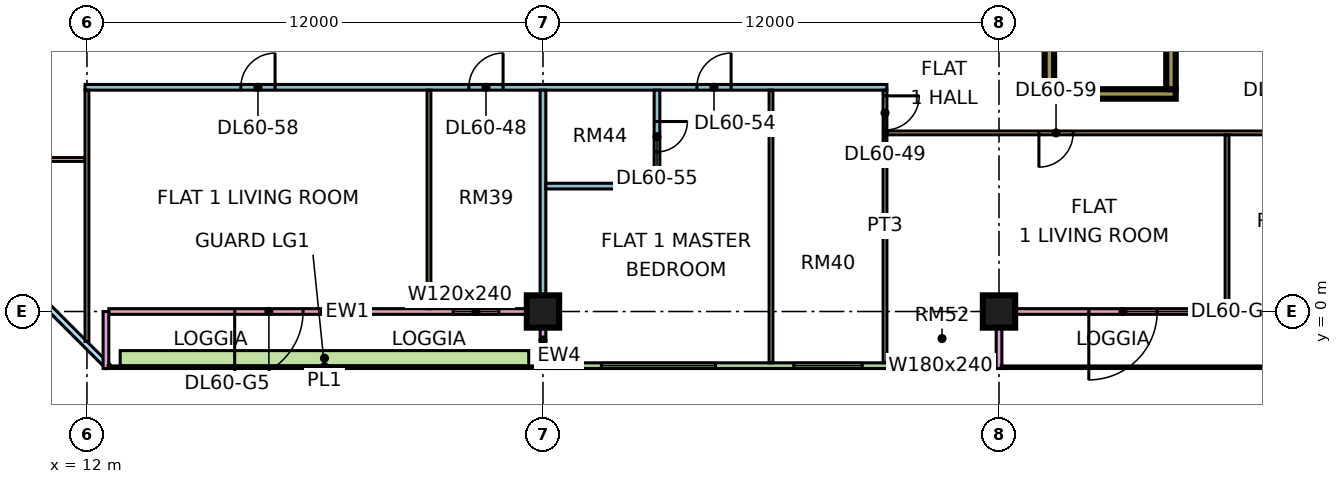
"""IFC4 building model, lengths in metres.
Left out: names, types, materials, properties, quantities, classifications, styles, units other than length and angle.
Written with IfcOpenShell. Run it as: python <this file> out.ifc"""

import sys

from ifc_helpers import new_model, si_unit, direction, frame, frame_2d, origin, origin_2d, place, context, subcontext, project, spatial, rectangle, extrude, element, fill, save


model = new_model("IFC4")
c1 = context("Model", 3, precision=1e-05, world=origin(), true_north=direction((0.0, 1.0)))
c2 = subcontext(c1, "Body", "Model", "MODEL_VIEW")
j1 = project(units=[si_unit("LENGTHUNIT", "METRE"), si_unit("PLANEANGLEUNIT", "RADIAN")], contexts=[c1])
p1 = place(None, origin())
s1 = spatial("IfcSite", under=j1, at=p1, CompositionType="ELEMENT")
p2 = place(p1, origin())
s2 = spatial("IfcBuilding", under=s1, at=p2, CompositionType="ELEMENT")
p3 = place(p2, frame((0.0, 0.0, 252.9)))
s3 = spatial("IfcBuildingStorey", under=s2, at=p3, CompositionType="ELEMENT", Elevation=252.9)
for number, where, z_axis, x_axis in (
    (1, (24.0, 0.0, 0.0), (0.0, 0.0, 1.0), (1.0, 0.0, 0.0)),
    (2, (36.0, 0.0, 0.0), (0.0, 0.0, 1.0), (1.0, 0.0, 0.0)),
):
    element("IfcColumn", number, at=place(p3, frame(where, z_axis=z_axis, x_axis=x_axis)), inside=s3, PredefinedType="COLUMN", context=c2, shape_type="SweptSolid", body=[
        extrude(rectangle(XDim=0.85, YDim=0.85, at=origin_2d()), origin(), (0.0, 0.0, 1.0), 3.75),
    ])
p4 = place(p3, frame((37.2, 5.725, 0.0), z_axis=(0.0, 0.0, 1.0), x_axis=(1.0, 0.0, 0.0)))
e3 = element("IfcWall", 3, at=p4, inside=s3, PredefinedType="SHEAR", context=c2, shape_type="SweptSolid", body=[
    extrude(rectangle(XDim=3.45, YDim=0.25, at=frame_2d((1.725, 0.0))), origin(), (0.0, 0.0, 1.0), 3.75),
])
for number, where, z_axis, x_axis in (
    (4, (37.325, 5.85, 0.0), (0.0, 0.0, 1.0), (0.0, 1.0, 0.0)),
    (5, (40.525, 5.85, 0.0), (0.0, 0.0, 1.0), (0.0, 1.0, 0.0)),
):
    element("IfcWall", number, at=place(p3, frame(where, z_axis=z_axis, x_axis=x_axis)), inside=s3, PredefinedType="SHEAR", context=c2, shape_type="SweptSolid", body=[
        extrude(rectangle(XDim=6.5, YDim=0.25, at=frame_2d((3.25, 0.0))), origin(), (0.0, 0.0, 1.0), 3.75),
    ])
p5 = place(p3, frame((-1.447, 12.553, 0.0), z_axis=(0.0, 0.0, 1.0), x_axis=(0.707106781187, -0.707106781187, 0.0)))
e6 = element("IfcWall", 6, at=p5, inside=s3, PredefinedType="SOLIDWALL", context=c2, shape_type="SweptSolid", body=[
    extrude(rectangle(XDim=19.799, YDim=0.15, at=frame_2d((9.899, 0.0))), origin(), (0.0, 0.0, 1.0), 3.3),
])
p6 = place(p5, frame((2.212, 0.0, 0.45)))
e7 = element("IfcOpeningElement", 7, at=p6, cuts=e6, PredefinedType="OPENING", context=c2, shape_type="SweptSolid", body=[
    extrude(rectangle(XDim=3.0, YDim=2.4, at=frame_2d((1.5, 1.2))), frame((0.0, 0.085, 0.0), z_axis=(0.0, -1.0, 0.0), x_axis=(1.0, 0.0, 0.0)), (0.0, 0.0, 1.0), 0.17),
])
p7 = place(p5, frame((10.216, 0.0, 0.45)))
e8 = element("IfcOpeningElement", 8, at=p7, cuts=e6, PredefinedType="OPENING", context=c2, shape_type="SweptSolid", body=[
    extrude(rectangle(XDim=3.0, YDim=2.4, at=frame_2d((1.5, 1.2))), frame((0.0, 0.085, 0.0), z_axis=(0.0, -1.0, 0.0), x_axis=(1.0, 0.0, 0.0)), (0.0, 0.0, 1.0), 0.17),
])
p8 = place(p3, frame((12.575, 0.0, 0.0), z_axis=(0.0, 0.0, 1.0), x_axis=(1.0, 0.0, 0.0)))
e9 = element("IfcWall", 9, at=p8, inside=s3, PredefinedType="SOLIDWALL", context=c2, shape_type="SweptSolid", body=[
    extrude(rectangle(XDim=11.35, YDim=0.15, at=frame_2d((5.675, 0.0))), origin(), (0.0, 0.0, 1.0), 3.3),
])
p9 = place(p8, frame((3.312, 0.0, 0.0)))
e10 = element("IfcOpeningElement", 10, at=p9, cuts=e9, PredefinedType="OPENING", context=c2, shape_type="SweptSolid", body=[
    extrude(rectangle(XDim=1.8, YDim=2.4, at=frame_2d((0.9, 1.2))), frame((0.0, 0.085, 0.0), z_axis=(0.0, -1.0, 0.0), x_axis=(1.0, 0.0, 0.0)), (0.0, 0.0, 1.0), 0.17),
])
p10 = place(p8, frame((9.062, 0.0, 0.45)))
e11 = element("IfcOpeningElement", 11, at=p10, cuts=e9, PredefinedType="OPENING", context=c2, shape_type="SweptSolid", body=[
    extrude(rectangle(XDim=1.2, YDim=2.4, at=frame_2d((0.6, 1.2))), frame((0.0, 0.085, 0.0), z_axis=(0.0, -1.0, 0.0), x_axis=(1.0, 0.0, 0.0)), (0.0, 0.0, 1.0), 0.17),
])
for number, where, z_axis, x_axis in (
    (12, (12.5, -1.5, 0.0), (0.0, 0.0, 1.0), (0.0, 1.0, 0.0)),
    (13, (24.0, -1.5, 0.0), (0.0, 0.0, 1.0), (0.0, 1.0, 0.0)),
):
    element("IfcWall", number, at=place(p3, frame(where, z_axis=z_axis, x_axis=x_axis)), inside=s3, PredefinedType="SOLIDWALL", context=c2, shape_type="SweptSolid", body=[
        extrude(rectangle(XDim=1.5, YDim=0.15, at=frame_2d((0.75, 0.0))), origin(), (0.0, 0.0, 1.0), 3.3),
    ])
p11 = place(p3, frame((24.075, -1.425, 0.0), z_axis=(0.0, 0.0, 1.0), x_axis=(1.0, 0.0, 0.0)))
e14 = element("IfcWall", 14, at=p11, inside=s3, PredefinedType="SOLIDWALL", context=c2, shape_type="SweptSolid", body=[
    extrude(rectangle(XDim=11.85, YDim=0.15, at=frame_2d((5.925, 0.0))), origin(), (0.0, 0.0, 1.0), 3.3),
])
p12 = place(p11, frame((1.462, 0.0, 0.45)))
e15 = element("IfcOpeningElement", 15, at=p12, cuts=e14, PredefinedType="OPENING", context=c2, shape_type="SweptSolid", body=[
    extrude(rectangle(XDim=3.0, YDim=2.4, at=frame_2d((1.5, 1.2))), frame((0.0, 0.085, 0.0), z_axis=(0.0, -1.0, 0.0), x_axis=(1.0, 0.0, 0.0)), (0.0, 0.0, 1.0), 0.17),
])
p13 = place(p11, frame((6.525, 0.0, 0.45)))
e16 = element("IfcOpeningElement", 16, at=p13, cuts=e14, PredefinedType="OPENING", context=c2, shape_type="SweptSolid", body=[
    extrude(rectangle(XDim=1.8, YDim=2.4, at=frame_2d((0.9, 1.2))), frame((0.0, 0.085, 0.0), z_axis=(0.0, -1.0, 0.0), x_axis=(1.0, 0.0, 0.0)), (0.0, 0.0, 1.0), 0.17),
])
p14 = place(p11, frame((9.488, 0.0, 0.45)))
e17 = element("IfcOpeningElement", 17, at=p14, cuts=e14, PredefinedType="OPENING", context=c2, shape_type="SweptSolid", body=[
    extrude(rectangle(XDim=1.8, YDim=2.4, at=frame_2d((0.9, 1.2))), frame((0.0, 0.085, 0.0), z_axis=(0.0, -1.0, 0.0), x_axis=(1.0, 0.0, 0.0)), (0.0, 0.0, 1.0), 0.17),
])
p15 = place(p3, frame((36.075, 0.0, 0.0), z_axis=(0.0, 0.0, 1.0), x_axis=(1.0, 0.0, 0.0)))
e18 = element("IfcWall", 18, at=p15, inside=s3, PredefinedType="SOLIDWALL", context=c2, shape_type="SweptSolid", body=[
    extrude(rectangle(XDim=11.85, YDim=0.15, at=frame_2d((5.925, 0.0))), origin(), (0.0, 0.0, 1.0), 3.3),
])
p16 = place(p15, frame((2.288, 0.0, 0.0)))
e19 = element("IfcOpeningElement", 19, at=p16, cuts=e18, PredefinedType="OPENING", context=c2, shape_type="SweptSolid", body=[
    extrude(rectangle(XDim=1.8, YDim=2.4, at=frame_2d((0.9, 1.2))), frame((0.0, 0.085, 0.0), z_axis=(0.0, -1.0, 0.0), x_axis=(1.0, 0.0, 0.0)), (0.0, 0.0, 1.0), 0.17),
])
p17 = place(p15, frame((6.562, 0.0, 0.45)))
e20 = element("IfcOpeningElement", 20, at=p17, cuts=e18, PredefinedType="OPENING", context=c2, shape_type="SweptSolid", body=[
    extrude(rectangle(XDim=1.2, YDim=2.4, at=frame_2d((0.6, 1.2))), frame((0.0, 0.085, 0.0), z_axis=(0.0, -1.0, 0.0), x_axis=(1.0, 0.0, 0.0)), (0.0, 0.0, 1.0), 0.17),
])
p18 = place(p15, frame((10.05, 0.0, 0.45)))
e21 = element("IfcOpeningElement", 21, at=p18, cuts=e18, PredefinedType="OPENING", context=c2, shape_type="SweptSolid", body=[
    extrude(rectangle(XDim=1.2, YDim=2.4, at=frame_2d((0.6, 1.2))), frame((0.0, 0.085, 0.0), z_axis=(0.0, -1.0, 0.0), x_axis=(1.0, 0.0, 0.0)), (0.0, 0.0, 1.0), 0.17),
])
p19 = place(p3, frame((36.0, -1.5, 0.0), z_axis=(0.0, 0.0, 1.0), x_axis=(0.0, 1.0, 0.0)))
e22 = element("IfcWall", 22, at=p19, inside=s3, PredefinedType="SOLIDWALL", context=c2, shape_type="SweptSolid", body=[
    extrude(rectangle(XDim=1.5, YDim=0.15, at=frame_2d((0.75, 0.0))), origin(), (0.0, 0.0, 1.0), 3.3),
])
p20 = place(p3, frame((12.875, -1.229, 0.0), z_axis=(0.0, 0.0, 1.0), x_axis=(1.0, 0.0, 0.0)))
e23 = element("IfcWall", 23, at=p20, inside=s3, PredefinedType="SOLIDWALL", context=c2, shape_type="SweptSolid", body=[
    extrude(rectangle(XDim=10.75, YDim=0.4, at=frame_2d((5.375, 0.0))), origin(), (0.0, 0.0, 1.0), 0.7),
])
p21 = place(p3, frame((9.05, 4.0, 0.0), z_axis=(0.0, 0.0, 1.0), x_axis=(1.0, 0.0, 0.0)))
e24 = element("IfcWall", 24, at=p21, inside=s3, PredefinedType="PARTITIONING", context=c2, shape_type="SweptSolid", body=[
    extrude(rectangle(XDim=2.9, YDim=0.1, at=frame_2d((1.45, 0.0))), origin(), (0.0, 0.0, 1.0), 3.3),
])
p22 = place(p3, frame((11.95, 5.9, 0.0), z_axis=(0.0, 0.0, 1.0), x_axis=(1.0, 0.0, 0.0)))
e25 = element("IfcWall", 25, at=p22, inside=s3, PredefinedType="PARTITIONING", context=c2, shape_type="SweptSolid", body=[
    extrude(rectangle(XDim=21.1, YDim=0.15, at=frame_2d((10.55, 0.0))), origin(), (0.0, 0.0, 1.0), 3.3),
])
p23 = place(p22, frame((10.1, 0.0, 0.0)))
e26 = element("IfcOpeningElement", 26, at=p23, cuts=e25, PredefinedType="OPENING", context=c2, shape_type="SweptSolid", body=[
    extrude(rectangle(XDim=0.9, YDim=2.1, at=frame_2d((0.45, 1.05))), frame((0.0, 0.085, 0.0), z_axis=(0.0, -1.0, 0.0), x_axis=(1.0, 0.0, 0.0)), (0.0, 0.0, 1.0), 0.17),
])
p24 = place(p22, frame((16.1, 0.0, 0.0)))
e27 = element("IfcOpeningElement", 27, at=p24, cuts=e25, PredefinedType="OPENING", context=c2, shape_type="SweptSolid", body=[
    extrude(rectangle(XDim=0.9, YDim=2.1, at=frame_2d((0.45, 1.05))), frame((0.0, 0.085, 0.0), z_axis=(0.0, -1.0, 0.0), x_axis=(1.0, 0.0, 0.0)), (0.0, 0.0, 1.0), 0.17),
])
p25 = place(p22, frame((4.1, 0.0, 0.0)))
e28 = element("IfcOpeningElement", 28, at=p25, cuts=e25, PredefinedType="OPENING", context=c2, shape_type="SweptSolid", body=[
    extrude(rectangle(XDim=0.9, YDim=2.1, at=frame_2d((0.45, 1.05))), frame((0.0, 0.085, 0.0), z_axis=(0.0, -1.0, 0.0), x_axis=(1.0, 0.0, 0.0)), (0.0, 0.0, 1.0), 0.17),
])
p26 = place(p3, frame((12.0, -0.788, 0.0), z_axis=(0.0, 0.0, 1.0), x_axis=(0.0, 1.0, 0.0)))
e29 = element("IfcWall", 29, at=p26, inside=s3, PredefinedType="PARTITIONING", context=c2, shape_type="SweptSolid", body=[
    extrude(rectangle(XDim=6.613, YDim=0.1, at=frame_2d((3.306, 0.0))), origin(), (0.0, 0.0, 1.0), 3.3),
])
p27 = place(p3, frame((21.0, 0.074, 0.0), z_axis=(0.0, 0.0, 1.0), x_axis=(0.0, 1.0, 0.0)))
e30 = element("IfcWall", 30, at=p27, inside=s3, PredefinedType="PARTITIONING", context=c2, shape_type="SweptSolid", body=[
    extrude(rectangle(XDim=5.751, YDim=0.1, at=frame_2d((2.875, 0.0))), origin(), (0.0, 0.0, 1.0), 3.3),
])
p28 = place(p3, frame((24.0, 0.0, 0.0), z_axis=(0.0, 0.0, 1.0), x_axis=(0.0, 1.0, 0.0)))
e31 = element("IfcWall", 31, at=p28, inside=s3, PredefinedType="PARTITIONING", context=c2, shape_type="SweptSolid", body=[
    extrude(rectangle(XDim=5.825, YDim=0.15, at=frame_2d((2.913, 0.0))), origin(), (0.0, 0.0, 1.0), 3.3),
])
p29 = place(p3, frame((24.075, 3.3, 0.0), z_axis=(0.0, 0.0, 1.0), x_axis=(1.0, 0.0, 0.0)))
e32 = element("IfcWall", 32, at=p29, inside=s3, PredefinedType="PARTITIONING", context=c2, shape_type="SweptSolid", body=[
    extrude(rectangle(XDim=3.0, YDim=0.15, at=frame_2d((1.5, 0.0))), origin(), (0.0, 0.0, 1.0), 3.3),
])
p30 = place(p3, frame((27.0, 3.375, 0.0), z_axis=(0.0, 0.0, 1.0), x_axis=(0.0, 1.0, 0.0)))
e33 = element("IfcWall", 33, at=p30, inside=s3, PredefinedType="PARTITIONING", context=c2, shape_type="SweptSolid", body=[
    extrude(rectangle(XDim=2.45, YDim=0.15, at=frame_2d((1.225, 0.0))), origin(), (0.0, 0.0, 1.0), 3.3),
])
p31 = place(p30, frame((0.825, 0.0, 0.0)))
e34 = element("IfcOpeningElement", 34, at=p31, cuts=e33, PredefinedType="OPENING", context=c2, shape_type="SweptSolid", body=[
    extrude(rectangle(XDim=0.8, YDim=2.1, at=frame_2d((0.4, 1.05))), frame((0.0, 0.085, 0.0), z_axis=(0.0, -1.0, 0.0), x_axis=(1.0, 0.0, 0.0)), (0.0, 0.0, 1.0), 0.17),
])
p32 = place(p3, frame((30.0, -1.351, 0.0), z_axis=(0.0, 0.0, 1.0), x_axis=(0.0, 1.0, 0.0)))
e35 = element("IfcWall", 35, at=p32, inside=s3, PredefinedType="PARTITIONING", context=c2, shape_type="SweptSolid", body=[
    extrude(rectangle(XDim=7.176, YDim=0.1, at=frame_2d((3.588, 0.0))), origin(), (0.0, 0.0, 1.0), 3.3),
])
p33 = place(p3, frame((33.0, -1.35, 0.0), z_axis=(0.0, 0.0, 1.0), x_axis=(0.0, 1.0, 0.0)))
e36 = element("IfcWall", 36, at=p33, inside=s3, PredefinedType="PARTITIONING", context=c2, shape_type="SweptSolid", body=[
    extrude(rectangle(XDim=7.175, YDim=0.1, at=frame_2d((3.587, 0.0))), origin(), (0.0, 0.0, 1.0), 3.3),
])
p34 = place(p33, frame((6.125, 0.0, 0.0)))
e37 = element("IfcOpeningElement", 37, at=p34, cuts=e36, PredefinedType="OPENING", context=c2, shape_type="SweptSolid", body=[
    extrude(rectangle(XDim=0.9, YDim=2.1, at=frame_2d((0.45, 1.05))), frame((0.0, 0.06, 0.0), z_axis=(0.0, -1.0, 0.0), x_axis=(1.0, 0.0, 0.0)), (0.0, 0.0, 1.0), 0.12),
])
p35 = place(p3, frame((33.05, 4.7, 0.0), z_axis=(0.0, 0.0, 1.0), x_axis=(1.0, 0.0, 0.0)))
e38 = element("IfcWall", 38, at=p35, inside=s3, PredefinedType="PARTITIONING", context=c2, shape_type="SweptSolid", body=[
    extrude(rectangle(XDim=14.85, YDim=0.1, at=frame_2d((7.425, 0.0))), origin(), (0.0, 0.0, 1.0), 3.3),
])
p36 = place(p35, frame((10.0, 0.0, 0.0)))
e39 = element("IfcOpeningElement", 39, at=p36, cuts=e38, PredefinedType="OPENING", context=c2, shape_type="SweptSolid", body=[
    extrude(rectangle(XDim=0.9, YDim=2.1, at=frame_2d((0.45, 1.05))), frame((0.0, 0.06, 0.0), z_axis=(0.0, -1.0, 0.0), x_axis=(1.0, 0.0, 0.0)), (0.0, 0.0, 1.0), 0.12),
])
p37 = place(p35, frame((13.0, 0.0, 0.0)))
e40 = element("IfcOpeningElement", 40, at=p37, cuts=e38, PredefinedType="OPENING", context=c2, shape_type="SweptSolid", body=[
    extrude(rectangle(XDim=0.9, YDim=2.1, at=frame_2d((0.45, 1.05))), frame((0.0, 0.06, 0.0), z_axis=(0.0, -1.0, 0.0), x_axis=(1.0, 0.0, 0.0)), (0.0, 0.0, 1.0), 0.12),
])
p38 = place(p35, frame((4.0, 0.0, 0.0)))
e41 = element("IfcOpeningElement", 41, at=p38, cuts=e38, PredefinedType="OPENING", context=c2, shape_type="SweptSolid", body=[
    extrude(rectangle(XDim=0.9, YDim=2.1, at=frame_2d((0.45, 1.05))), frame((0.0, 0.06, 0.0), z_axis=(0.0, -1.0, 0.0), x_axis=(1.0, 0.0, 0.0)), (0.0, 0.0, 1.0), 0.12),
])
p39 = place(p3, frame((42.0, 0.074, 0.0), z_axis=(0.0, 0.0, 1.0), x_axis=(0.0, 1.0, 0.0)))
e42 = element("IfcWall", 42, at=p39, inside=s3, PredefinedType="PARTITIONING", context=c2, shape_type="SweptSolid", body=[
    extrude(rectangle(XDim=4.576, YDim=0.1, at=frame_2d((2.288, 0.0))), origin(), (0.0, 0.0, 1.0), 3.3),
])
p40 = place(p9, frame((1.8, 0.0, 0.0), z_axis=(0.0, 0.0, 1.0), x_axis=(-1.0, 0.0, 0.0)))
e43 = element("IfcDoor", 43, at=p40, inside=s3, OperationType="DOUBLE_DOOR_SINGLE_SWING", PredefinedType="DOOR", context=c2, shape_type="SweptSolid", body=[
    extrude(rectangle(XDim=1.8, YDim=2.4, at=frame_2d((0.9, 1.2))), frame((0.0, 0.025, 0.0), z_axis=(0.0, -1.0, 0.0), x_axis=(1.0, 0.0, 0.0)), (0.0, 0.0, 1.0), 0.05),
])
fill(e10, e43)
p41 = place(p10, origin())
e44 = element("IfcWindow", 44, at=p41, inside=s3, PartitioningType="SINGLE_PANEL", PredefinedType="WINDOW", context=c2, shape_type="SweptSolid", body=[
    extrude(rectangle(XDim=1.2, YDim=2.4, at=frame_2d((0.6, 1.2))), frame((0.0, 0.03, 0.0), z_axis=(0.0, -1.0, 0.0), x_axis=(1.0, 0.0, 0.0)), (0.0, 0.0, 1.0), 0.06),
])
fill(e11, e44)
p42 = place(p12, origin())
e45 = element("IfcWindow", 45, at=p42, inside=s3, PartitioningType="SINGLE_PANEL", PredefinedType="WINDOW", context=c2, shape_type="SweptSolid", body=[
    extrude(rectangle(XDim=3.0, YDim=2.4, at=frame_2d((1.5, 1.2))), frame((0.0, 0.03, 0.0), z_axis=(0.0, -1.0, 0.0), x_axis=(1.0, 0.0, 0.0)), (0.0, 0.0, 1.0), 0.06),
])
fill(e15, e45)
p43 = place(p13, origin())
e46 = element("IfcWindow", 46, at=p43, inside=s3, PartitioningType="SINGLE_PANEL", PredefinedType="WINDOW", context=c2, shape_type="SweptSolid", body=[
    extrude(rectangle(XDim=1.8, YDim=2.4, at=frame_2d((0.9, 1.2))), frame((0.0, 0.03, 0.0), z_axis=(0.0, -1.0, 0.0), x_axis=(1.0, 0.0, 0.0)), (0.0, 0.0, 1.0), 0.06),
])
fill(e16, e46)
p44 = place(p14, origin())
e47 = element("IfcWindow", 47, at=p44, inside=s3, PartitioningType="SINGLE_PANEL", PredefinedType="WINDOW", context=c2, shape_type="SweptSolid", body=[
    extrude(rectangle(XDim=1.8, YDim=2.4, at=frame_2d((0.9, 1.2))), frame((0.0, 0.03, 0.0), z_axis=(0.0, -1.0, 0.0), x_axis=(1.0, 0.0, 0.0)), (0.0, 0.0, 1.0), 0.06),
])
fill(e17, e47)
p45 = place(p16, frame((1.8, 0.0, 0.0), z_axis=(0.0, 0.0, 1.0), x_axis=(-1.0, 0.0, 0.0)))
e48 = element("IfcDoor", 48, at=p45, inside=s3, OperationType="DOUBLE_DOOR_SINGLE_SWING", PredefinedType="DOOR", context=c2, shape_type="SweptSolid", body=[
    extrude(rectangle(XDim=1.8, YDim=2.4, at=frame_2d((0.9, 1.2))), frame((0.0, 0.025, 0.0), z_axis=(0.0, -1.0, 0.0), x_axis=(1.0, 0.0, 0.0)), (0.0, 0.0, 1.0), 0.05),
])
fill(e19, e48)
p46 = place(p17, origin())
e49 = element("IfcWindow", 49, at=p46, inside=s3, PartitioningType="SINGLE_PANEL", PredefinedType="WINDOW", context=c2, shape_type="SweptSolid", body=[
    extrude(rectangle(XDim=1.2, YDim=2.4, at=frame_2d((0.6, 1.2))), frame((0.0, 0.03, 0.0), z_axis=(0.0, -1.0, 0.0), x_axis=(1.0, 0.0, 0.0)), (0.0, 0.0, 1.0), 0.06),
])
fill(e20, e49)
p47 = place(p23, frame((0.9, 0.0, 0.0), z_axis=(0.0, 0.0, 1.0), x_axis=(-1.0, 0.0, 0.0)))
e50 = element("IfcDoor", 50, at=p47, inside=s3, OperationType="SINGLE_SWING_RIGHT", PredefinedType="DOOR", context=c2, shape_type="SweptSolid", body=[
    extrude(rectangle(XDim=0.9, YDim=2.1, at=frame_2d((0.45, 1.05))), frame((0.0, 0.025, 0.0), z_axis=(0.0, -1.0, 0.0), x_axis=(1.0, 0.0, 0.0)), (0.0, 0.0, 1.0), 0.05),
])
fill(e26, e50)
p48 = place(p34, origin())
e51 = element("IfcDoor", 51, at=p48, inside=s3, OperationType="SINGLE_SWING_RIGHT", PredefinedType="DOOR", context=c2, shape_type="SweptSolid", body=[
    extrude(rectangle(XDim=0.9, YDim=2.1, at=frame_2d((0.45, 1.05))), frame((0.0, 0.025, 0.0), z_axis=(0.0, -1.0, 0.0), x_axis=(1.0, 0.0, 0.0)), (0.0, 0.0, 1.0), 0.05),
])
fill(e37, e51)
p49 = place(p24, frame((0.9, 0.0, 0.0), z_axis=(0.0, 0.0, 1.0), x_axis=(-1.0, 0.0, 0.0)))
e52 = element("IfcDoor", 52, at=p49, inside=s3, OperationType="SINGLE_SWING_RIGHT", PredefinedType="DOOR", context=c2, shape_type="SweptSolid", body=[
    extrude(rectangle(XDim=0.9, YDim=2.1, at=frame_2d((0.45, 1.05))), frame((0.0, 0.025, 0.0), z_axis=(0.0, -1.0, 0.0), x_axis=(1.0, 0.0, 0.0)), (0.0, 0.0, 1.0), 0.05),
])
fill(e27, e52)
p50 = place(p31, origin())
e53 = element("IfcDoor", 53, at=p50, inside=s3, OperationType="SINGLE_SWING_RIGHT", PredefinedType="DOOR", context=c2, shape_type="SweptSolid", body=[
    extrude(rectangle(XDim=0.8, YDim=2.1, at=frame_2d((0.4, 1.05))), frame((0.0, 0.025, 0.0), z_axis=(0.0, -1.0, 0.0), x_axis=(1.0, 0.0, 0.0)), (0.0, 0.0, 1.0), 0.05),
])
fill(e34, e53)
p51 = place(p25, frame((0.9, 0.0, 0.0), z_axis=(0.0, 0.0, 1.0), x_axis=(-1.0, 0.0, 0.0)))
e54 = element("IfcDoor", 54, at=p51, inside=s3, OperationType="SINGLE_SWING_RIGHT", PredefinedType="DOOR", context=c2, shape_type="SweptSolid", body=[
    extrude(rectangle(XDim=0.9, YDim=2.1, at=frame_2d((0.45, 1.05))), frame((0.0, 0.025, 0.0), z_axis=(0.0, -1.0, 0.0), x_axis=(1.0, 0.0, 0.0)), (0.0, 0.0, 1.0), 0.05),
])
fill(e28, e54)
p52 = place(p38, frame((0.9, 0.0, 0.0), z_axis=(0.0, 0.0, 1.0), x_axis=(-1.0, 0.0, 0.0)))
e55 = element("IfcDoor", 55, at=p52, inside=s3, OperationType="SINGLE_SWING_LEFT", PredefinedType="DOOR", context=c2, shape_type="SweptSolid", body=[
    extrude(rectangle(XDim=0.9, YDim=2.1, at=frame_2d((0.45, 1.05))), frame((0.0, 0.025, 0.0), z_axis=(0.0, -1.0, 0.0), x_axis=(1.0, 0.0, 0.0)), (0.0, 0.0, 1.0), 0.05),
])
fill(e41, e55)
save(model, sys.argv[1])
